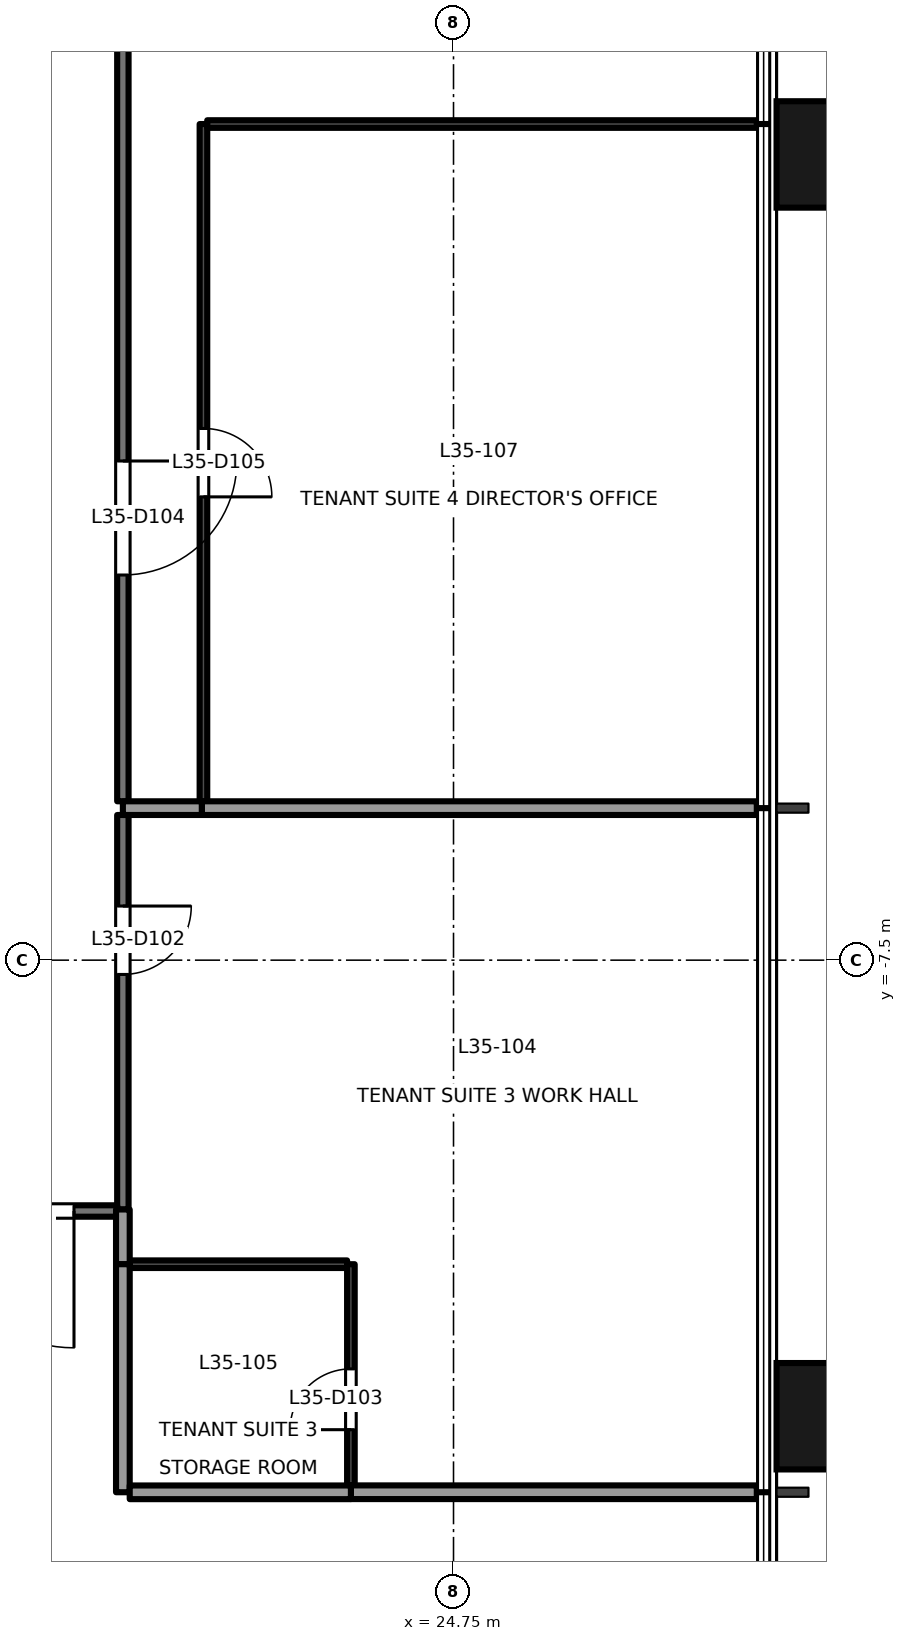
"""IFC4 building model, lengths in metres.
Left out: names, types, materials, properties, quantities, classifications, styles, units other than length and angle.
Written with IfcOpenShell. Run it as: python <this file> out.ifc"""

import sys

from ifc_helpers import new_model, si_unit, direction, frame, frame_2d, origin, origin_2d, place, context, subcontext, project, spatial, rectangle, extrude, element, fill, save


model = new_model("IFC4")
c1 = context("Model", 3, precision=1e-05, world=origin(), true_north=direction((0.0, 1.0)))
c2 = subcontext(c1, "Body", "Model", "MODEL_VIEW")
j1 = project(units=[si_unit("LENGTHUNIT", "METRE"), si_unit("PLANEANGLEUNIT", "RADIAN")], contexts=[c1])
p1 = place(None, origin())
s1 = spatial("IfcSite", under=j1, at=p1, CompositionType="ELEMENT")
p2 = place(p1, origin())
s2 = spatial("IfcBuilding", under=s1, at=p2, CompositionType="ELEMENT")
p3 = place(p2, frame((0.0, 0.0, 154.1)))
s3 = spatial("IfcBuildingStorey", under=s2, at=p3, CompositionType="ELEMENT", Elevation=154.1)
for number, where, z_axis, x_axis in (
    (1, (29.9, -13.5, -0.2), (0.0, 0.0, 1.0), (0.0, 1.0, 0.0)),
    (2, (29.9, 3.1, -0.2), (0.0, 0.0, 1.0), (0.0, 1.0, 0.0)),
):
    element("IfcColumn", number, at=place(p3, frame(where, z_axis=z_axis, x_axis=x_axis)), inside=s3, PredefinedType="COLUMN", context=c2, shape_type="SweptSolid", body=[
        extrude(rectangle(XDim=1.4, YDim=1.8, at=origin_2d()), origin(), (0.0, 0.0, 1.0), 4.0),
    ])
p4 = place(p3, frame((20.4, -5.59, 0.0), z_axis=(0.0, 0.0, 1.0), x_axis=(0.0, -1.0, 0.0)))
e3 = element("IfcWall", 3, at=p4, inside=s3, PredefinedType="PARTITIONING", context=c2, shape_type="SweptSolid", body=[
    extrude(rectangle(XDim=5.19, YDim=0.15, at=frame_2d((2.595, 0.0))), origin(), (0.0, 0.0, 1.0), 3.8),
])
p5 = place(p4, frame((1.198, 0.0, 0.0)))
e4 = element("IfcOpeningElement", 4, at=p5, cuts=e3, PredefinedType="OPENING", context=c2, shape_type="SweptSolid", body=[
    extrude(rectangle(XDim=0.9, YDim=2.1, at=frame_2d((0.45, 1.05))), frame((0.0, 0.085, 0.0), z_axis=(0.0, -1.0, 0.0), x_axis=(1.0, 0.0, 0.0)), (0.0, 0.0, 1.0), 0.171),
])
p6 = place(p3, frame((20.4, 7.5, 0.0), z_axis=(0.0, 0.0, 1.0), x_axis=(0.0, -1.0, 0.0)))
e5 = element("IfcWall", 5, at=p6, inside=s3, PredefinedType="PARTITIONING", context=c2, shape_type="SweptSolid", body=[
    extrude(rectangle(XDim=12.91, YDim=0.15, at=frame_2d((6.455, 0.0))), origin(), (0.0, 0.0, 1.0), 3.3),
])
p7 = place(p6, frame((8.433, 0.0, 0.0)))
e6 = element("IfcOpeningElement", 6, at=p7, cuts=e5, PredefinedType="OPENING", context=c2, shape_type="SweptSolid", body=[
    extrude(rectangle(XDim=1.5, YDim=2.1, at=frame_2d((0.75, 1.05))), frame((0.0, 0.085, 0.0), z_axis=(0.0, -1.0, 0.0), x_axis=(1.0, 0.0, 0.0)), (0.0, 0.0, 1.0), 0.171),
])
p8 = place(p3, frame((20.325, -10.8, 0.0), z_axis=(0.0, 0.0, 1.0), x_axis=(-1.0, 0.0, 0.0)))
e7 = element("IfcWall", 7, at=p8, inside=s3, PredefinedType="PARTITIONING", context=c2, shape_type="SweptSolid", body=[
    extrude(rectangle(XDim=3.572, YDim=0.15, at=frame_2d((1.786, 0.0))), origin(), (0.0, 0.0, 1.0), 3.8),
])
p9 = place(p8, frame((0.568, 0.0, 0.0)))
e8 = element("IfcOpeningElement", 8, at=p9, cuts=e7, PredefinedType="OPENING", context=c2, shape_type="SweptSolid", body=[
    extrude(rectangle(XDim=1.8, YDim=2.1, at=frame_2d((0.9, 1.05))), frame((0.0, 0.085, 0.0), z_axis=(0.0, -1.0, 0.0), x_axis=(1.0, 0.0, 0.0)), (0.0, 0.0, 1.0), 0.171),
])
p10 = place(p3, frame((23.35, -11.5, 0.0), z_axis=(0.0, 0.0, 1.0), x_axis=(-1.0, 0.0, 0.0)))
e9 = element("IfcWall", 9, at=p10, inside=s3, PredefinedType="PARTITIONING", context=c2, shape_type="SweptSolid", body=[
    extrude(rectangle(XDim=2.86, YDim=0.1, at=frame_2d((1.43, 0.0))), origin(), (0.0, 0.0, 1.0), 3.8),
])
p11 = place(p3, frame((23.4, -14.41, 0.0), z_axis=(0.0, 0.0, 1.0), x_axis=(0.0, 1.0, 0.0)))
e10 = element("IfcWall", 10, at=p11, inside=s3, PredefinedType="PARTITIONING", context=c2, shape_type="SweptSolid", body=[
    extrude(rectangle(XDim=2.91, YDim=0.1, at=frame_2d((1.455, 0.0))), origin(), (0.0, 0.0, 1.0), 3.8),
])
p12 = place(p11, frame((0.733, 0.0, 0.0)))
e11 = element("IfcOpeningElement", 11, at=p12, cuts=e10, PredefinedType="OPENING", context=c2, shape_type="SweptSolid", body=[
    extrude(rectangle(XDim=0.8, YDim=2.1, at=frame_2d((0.4, 1.05))), frame((0.0, 0.061, 0.0), z_axis=(0.0, -1.0, 0.0), x_axis=(1.0, 0.0, 0.0)), (0.0, 0.0, 1.0), 0.121),
])
p13 = place(p3, frame((20.4, -5.5, 0.0), z_axis=(0.0, 0.0, 1.0), x_axis=(1.0, 0.0, 0.0)))
e12 = element("IfcWall", 12, at=p13, inside=s3, PredefinedType="PARTITIONING", context=c2, shape_type="SweptSolid", body=[
    extrude(rectangle(XDim=1.04, YDim=0.18, at=frame_2d((0.52, 0.0))), origin(), (0.0, 0.0, 1.0), 3.8),
])
p14 = place(p3, frame((21.44, -5.5, 0.0), z_axis=(0.0, 0.0, 1.0), x_axis=(1.0, 0.0, 0.0)))
e13 = element("IfcWall", 13, at=p14, inside=s3, PredefinedType="PARTITIONING", context=c2, shape_type="SweptSolid", body=[
    extrude(rectangle(XDim=7.3, YDim=0.18, at=frame_2d((3.65, 0.0))), origin(), (0.0, 0.0, 1.0), 3.8),
])
p15 = place(p3, frame((20.4, -11.5, 0.0), z_axis=(0.0, 0.0, 1.0), x_axis=(0.0, 1.0, 0.0)))
e14 = element("IfcWall", 14, at=p15, inside=s3, PredefinedType="PARTITIONING", context=c2, shape_type="SweptSolid", body=[
    extrude(rectangle(XDim=0.72, YDim=0.18, at=frame_2d((0.36, 0.0))), origin(), (0.0, 0.0, 1.0), 3.8),
])
p16 = place(p3, frame((28.74, -14.5, 0.0), z_axis=(0.0, 0.0, 1.0), x_axis=(-1.0, 0.0, 0.0)))
e15 = element("IfcWall", 15, at=p16, inside=s3, PredefinedType="PARTITIONING", context=c2, shape_type="SweptSolid", body=[
    extrude(rectangle(XDim=5.34, YDim=0.18, at=frame_2d((2.67, 0.0))), origin(), (0.0, 0.0, 1.0), 3.8),
])
p17 = place(p3, frame((20.4, -14.5, 0.0), z_axis=(0.0, 0.0, 1.0), x_axis=(0.0, 1.0, 0.0)))
e16 = element("IfcWall", 16, at=p17, inside=s3, PredefinedType="PARTITIONING", context=c2, shape_type="SweptSolid", body=[
    extrude(rectangle(XDim=3.0, YDim=0.18, at=frame_2d((1.5, 0.0))), origin(), (0.0, 0.0, 1.0), 3.8),
])
p18 = place(p3, frame((23.4, -14.501, 0.0), z_axis=(0.0, 0.0, 1.0), x_axis=(-1.0, 0.0, 0.0)))
e17 = element("IfcWall", 17, at=p18, inside=s3, PredefinedType="PARTITIONING", context=c2, shape_type="SweptSolid", body=[
    extrude(rectangle(XDim=2.91, YDim=0.18, at=frame_2d((1.455, 0.0))), origin(), (0.0, 0.0, 1.0), 3.8),
])
p19 = place(p3, frame((21.46, 3.5, 0.0), z_axis=(0.0, 0.0, 1.0), x_axis=(0.0, -1.0, 0.0)))
e18 = element("IfcWall", 18, at=p19, inside=s3, PredefinedType="PARTITIONING", context=c2, shape_type="SweptSolid", body=[
    extrude(rectangle(XDim=8.91, YDim=0.1, at=frame_2d((4.455, 0.0))), origin(), (0.0, 0.0, 1.0), 3.3),
])
p20 = place(p19, frame((4.005, 0.0, 0.0)))
e19 = element("IfcOpeningElement", 19, at=p20, cuts=e18, PredefinedType="OPENING", context=c2, shape_type="SweptSolid", body=[
    extrude(rectangle(XDim=0.9, YDim=2.1, at=frame_2d((0.45, 1.05))), frame((0.0, 0.061, 0.0), z_axis=(0.0, -1.0, 0.0), x_axis=(1.0, 0.0, 0.0)), (0.0, 0.0, 1.0), 0.121),
])
p21 = place(p3, frame((28.74, 3.5, 0.0), z_axis=(0.0, 0.0, 1.0), x_axis=(-1.0, 0.0, 0.0)))
e20 = element("IfcWall", 20, at=p21, inside=s3, PredefinedType="PARTITIONING", context=c2, shape_type="SweptSolid", body=[
    extrude(rectangle(XDim=7.23, YDim=0.1, at=frame_2d((3.615, 0.0))), origin(), (0.0, 0.0, 1.0), 3.8),
])
p22 = place(p5, origin())
e21 = element("IfcDoor", 21, at=p22, inside=s3, OperationType="SINGLE_SWING_LEFT", PredefinedType="DOOR", context=c2, shape_type="SweptSolid", body=[
    extrude(rectangle(XDim=0.9, YDim=2.1, at=frame_2d((0.45, 1.05))), frame((0.0, 0.025, 0.0), z_axis=(0.0, -1.0, 0.0), x_axis=(1.0, 0.0, 0.0)), (0.0, 0.0, 1.0), 0.05),
])
fill(e4, e21)
p23 = place(p12, origin())
e22 = element("IfcDoor", 22, at=p23, inside=s3, OperationType="SINGLE_SWING_LEFT", PredefinedType="DOOR", context=c2, shape_type="SweptSolid", body=[
    extrude(rectangle(XDim=0.8, YDim=2.1, at=frame_2d((0.4, 1.05))), frame((0.0, 0.025, 0.0), z_axis=(0.0, -1.0, 0.0), x_axis=(1.0, 0.0, 0.0)), (0.0, 0.0, 1.0), 0.05),
])
fill(e11, e22)
p24 = place(p7, origin())
e23 = element("IfcDoor", 23, at=p24, inside=s3, OperationType="DOUBLE_DOOR_SINGLE_SWING", PredefinedType="DOOR", context=c2, shape_type="SweptSolid", body=[
    extrude(rectangle(XDim=1.5, YDim=2.1, at=frame_2d((0.75, 1.05))), frame((0.0, 0.025, 0.0), z_axis=(0.0, -1.0, 0.0), x_axis=(1.0, 0.0, 0.0)), (0.0, 0.0, 1.0), 0.05),
])
fill(e6, e23)
p25 = place(p20, origin())
e24 = element("IfcDoor", 24, at=p25, inside=s3, OperationType="SINGLE_SWING_RIGHT", PredefinedType="DOOR", context=c2, shape_type="SweptSolid", body=[
    extrude(rectangle(XDim=0.9, YDim=2.1, at=frame_2d((0.45, 1.05))), frame((0.0, 0.025, 0.0), z_axis=(0.0, -1.0, 0.0), x_axis=(1.0, 0.0, 0.0)), (0.0, 0.0, 1.0), 0.05),
])
fill(e19, e24)
p26 = place(p9, origin())
e25 = element("IfcDoor", 25, at=p26, inside=s3, OperationType="DOUBLE_DOOR_SINGLE_SWING", PredefinedType="DOOR", context=c2, shape_type="SweptSolid", body=[
    extrude(rectangle(XDim=1.8, YDim=2.1, at=frame_2d((0.9, 1.05))), frame((0.0, 0.025, 0.0), z_axis=(0.0, -1.0, 0.0), x_axis=(1.0, 0.0, 0.0)), (0.0, 0.0, 1.0), 0.05),
])
fill(e8, e25)
save(model, sys.argv[1])
